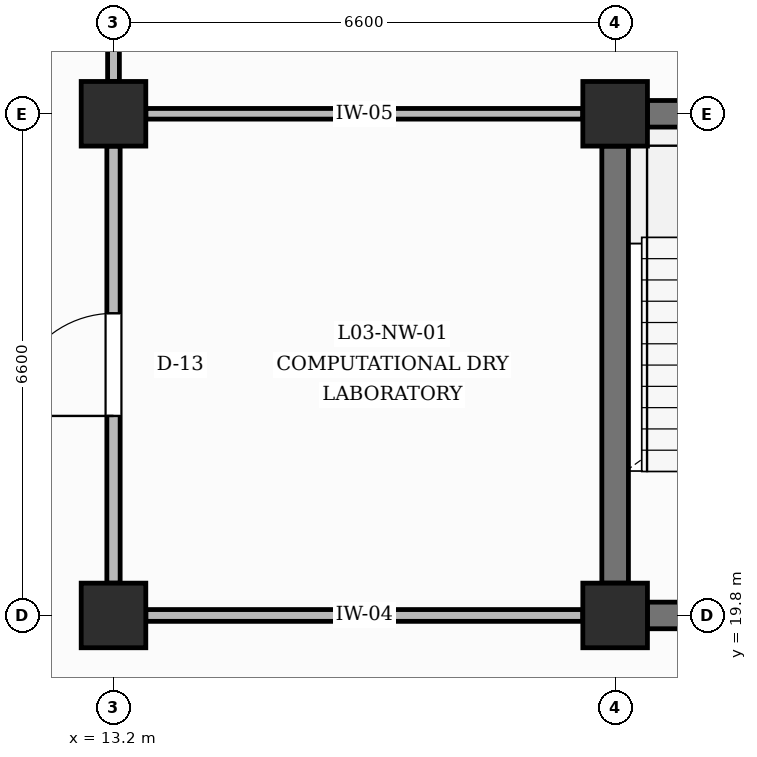
"""IFC4 building model, lengths in metres.
Left out: names, types, materials, properties, quantities, classifications, styles, units other than length and angle.
Written with IfcOpenShell. Run it as: python <this file> out.ifc"""

import sys

from ifc_helpers import new_model, si_unit, direction, frame, frame_2d, origin, origin_2d, place, context, subcontext, project, spatial, rectangle, extrude, element, fill, save


model = new_model("IFC4")
c1 = context("Model", 3, precision=1e-05, world=origin(), true_north=direction((0.0, 1.0)))
c2 = subcontext(c1, "Body", "Model", "MODEL_VIEW")
j1 = project(units=[si_unit("LENGTHUNIT", "METRE"), si_unit("PLANEANGLEUNIT", "RADIAN")], contexts=[c1])
p1 = place(None, origin())
s1 = spatial("IfcSite", under=j1, at=p1, CompositionType="ELEMENT")
p2 = place(p1, origin())
s2 = spatial("IfcBuilding", under=s1, at=p2, CompositionType="ELEMENT")
p3 = place(p2, frame((0.0, 0.0, 14.4)))
s3 = spatial("IfcBuildingStorey", under=s2, at=p3, CompositionType="ELEMENT", Elevation=14.4)
for number, where, z_axis, x_axis in (
    (1, (13.2, 19.8, 0.0), (0.0, 0.0, 1.0), (1.0, 0.0, 0.0)),
    (2, (13.2, 26.4, 0.0), (0.0, 0.0, 1.0), (1.0, 0.0, 0.0)),
    (3, (19.8, 19.8, 0.0), (0.0, 0.0, 1.0), (1.0, 0.0, 0.0)),
    (4, (19.8, 26.4, 0.0), (0.0, 0.0, 1.0), (1.0, 0.0, 0.0)),
):
    element("IfcColumn", number, at=place(p3, frame(where, z_axis=z_axis, x_axis=x_axis)), inside=s3, PredefinedType="COLUMN", context=c2, shape_type="SweptSolid", body=[
        extrude(rectangle(XDim=0.85, YDim=0.85, at=origin_2d()), origin(), (0.0, 0.0, 1.0), 4.2),
    ])
p4 = place(p3, frame((20.225, 19.8, 0.0), z_axis=(0.0, 0.0, 1.0), x_axis=(1.0, 0.0, 0.0)))
e5 = element("IfcWall", 5, at=p4, inside=s3, PredefinedType="SHEAR", context=c2, shape_type="SweptSolid", body=[
    extrude(rectangle(XDim=5.75, YDim=0.35, at=frame_2d((2.875, 0.0))), origin(), (0.0, 0.0, 1.0), 3.16),
])
p5 = place(p4, frame((2.325, 0.0, 0.0)))
e6 = element("IfcOpeningElement", 6, at=p5, cuts=e5, PredefinedType="OPENING", context=c2, shape_type="SweptSolid", body=[
    extrude(rectangle(XDim=1.1, YDim=2.15, at=frame_2d((0.55, 1.075))), frame((0.0, 0.185, 0.0), z_axis=(0.0, -1.0, 0.0), x_axis=(1.0, 0.0, 0.0)), (0.0, 0.0, 1.0), 0.37),
])
p6 = place(p3, frame((20.225, 26.4, 0.0), z_axis=(0.0, 0.0, 1.0), x_axis=(1.0, 0.0, 0.0)))
e7 = element("IfcWall", 7, at=p6, inside=s3, PredefinedType="SHEAR", context=c2, shape_type="SweptSolid", body=[
    extrude(rectangle(XDim=5.775, YDim=0.35, at=frame_2d((2.887, 0.0))), origin(), (0.0, 0.0, 1.0), 3.16),
])
p7 = place(p3, frame((19.8, 20.225, 0.0), z_axis=(0.0, 0.0, 1.0), x_axis=(0.0, 1.0, 0.0)))
e8 = element("IfcWall", 8, at=p7, inside=s3, PredefinedType="SHEAR", context=c2, shape_type="SweptSolid", body=[
    extrude(rectangle(XDim=5.75, YDim=0.35, at=frame_2d((2.875, 0.0))), origin(), (0.0, 0.0, 1.0), 3.16),
])
p8 = place(p3, frame((13.2, 20.225, 0.0), z_axis=(0.0, 0.0, 1.0), x_axis=(0.0, 1.0, 0.0)))
e9 = element("IfcWall", 9, at=p8, inside=s3, PredefinedType="PARTITIONING", context=c2, shape_type="SweptSolid", body=[
    extrude(rectangle(XDim=5.75, YDim=0.175, at=frame_2d((2.875, 0.0))), origin(), (0.0, 0.0, 1.0), 3.16),
])
p9 = place(p8, frame((2.2, 0.0, 0.0)))
e10 = element("IfcOpeningElement", 10, at=p9, cuts=e9, PredefinedType="OPENING", context=c2, shape_type="SweptSolid", body=[
    extrude(rectangle(XDim=1.35, YDim=2.3, at=frame_2d((0.675, 1.15))), frame((0.0, 0.097, 0.0), z_axis=(0.0, -1.0, 0.0), x_axis=(1.0, 0.0, 0.0)), (0.0, 0.0, 1.0), 0.195),
])
p10 = place(p3, frame((13.2, 26.825, 0.0), z_axis=(0.0, 0.0, 1.0), x_axis=(0.0, 1.0, 0.0)))
e11 = element("IfcWall", 11, at=p10, inside=s3, PredefinedType="PARTITIONING", context=c2, shape_type="SweptSolid", body=[
    extrude(rectangle(XDim=5.75, YDim=0.155, at=frame_2d((2.875, 0.0))), origin(), (0.0, 0.0, 1.0), 3.16),
])
p11 = place(p10, frame((2.285, 0.0, 0.0)))
e12 = element("IfcOpeningElement", 12, at=p11, cuts=e11, PredefinedType="OPENING", context=c2, shape_type="SweptSolid", body=[
    extrude(rectangle(XDim=1.18, YDim=2.2, at=frame_2d((0.59, 1.1))), frame((0.0, 0.087, 0.0), z_axis=(0.0, -1.0, 0.0), x_axis=(1.0, 0.0, 0.0)), (0.0, 0.0, 1.0), 0.175),
])
p12 = place(p3, frame((13.625, 19.8, 0.0), z_axis=(0.0, 0.0, 1.0), x_axis=(1.0, 0.0, 0.0)))
e13 = element("IfcWall", 13, at=p12, inside=s3, PredefinedType="PARTITIONING", context=c2, shape_type="SweptSolid", body=[
    extrude(rectangle(XDim=5.75, YDim=0.155, at=frame_2d((2.875, 0.0))), origin(), (0.0, 0.0, 1.0), 3.16),
])
p13 = place(p3, frame((13.625, 26.4, 0.0), z_axis=(0.0, 0.0, 1.0), x_axis=(1.0, 0.0, 0.0)))
e14 = element("IfcWall", 14, at=p13, inside=s3, PredefinedType="PARTITIONING", context=c2, shape_type="SweptSolid", body=[
    extrude(rectangle(XDim=5.75, YDim=0.14, at=frame_2d((2.875, 0.0))), origin(), (0.0, 0.0, 1.0), 3.16),
])
p14 = place(p9, origin())
e15 = element("IfcDoor", 15, at=p14, inside=s3, OperationType="SINGLE_SWING_LEFT", PredefinedType="DOOR", context=c2, shape_type="SweptSolid", body=[
    extrude(rectangle(XDim=1.35, YDim=2.3, at=frame_2d((0.675, 1.15))), frame((0.0, 0.025, 0.0), z_axis=(0.0, -1.0, 0.0), x_axis=(1.0, 0.0, 0.0)), (0.0, 0.0, 1.0), 0.05),
])
fill(e10, e15)
save(model, sys.argv[1])
